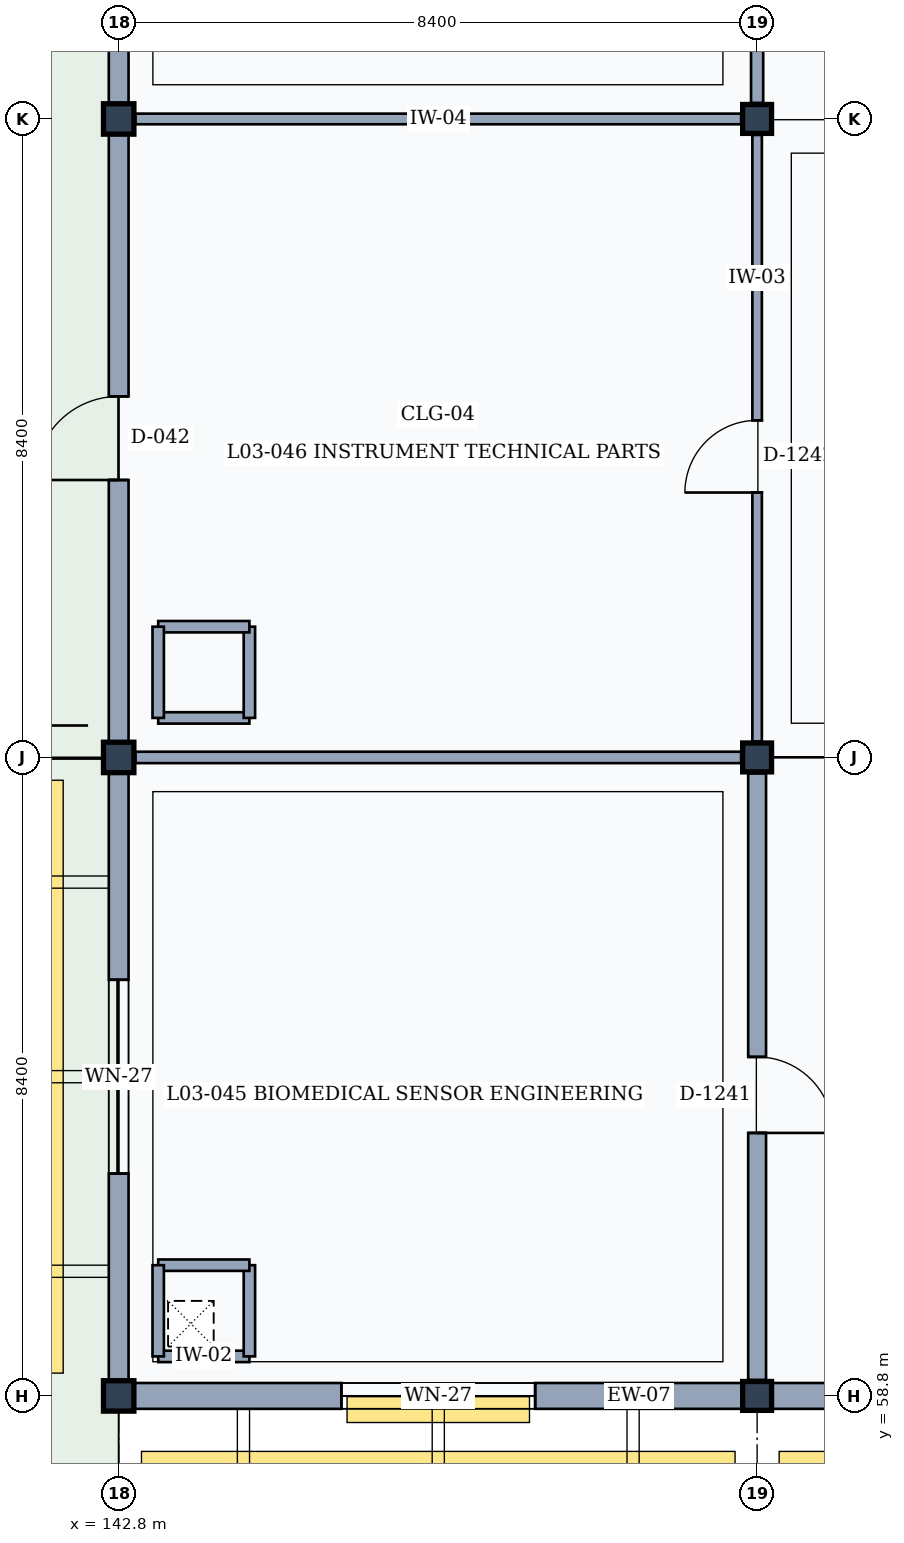
"""IFC4 building model, lengths in metres.
Left out: names, types, materials, properties, quantities, classifications, styles, units other than length and angle.
Written with IfcOpenShell. Run it as: python <this file> out.ifc"""

import sys

from ifc_helpers import new_model, si_unit, direction, frame, frame_2d, origin, origin_2d, place, context, subcontext, project, spatial, rectangle, extrude, element, fill, save


model = new_model("IFC4")
c1 = context("Model", 3, precision=1e-05, world=origin(), true_north=direction((0.0, 1.0)))
c2 = subcontext(c1, "Body", "Model", "MODEL_VIEW")
j1 = project(units=[si_unit("LENGTHUNIT", "METRE"), si_unit("PLANEANGLEUNIT", "RADIAN")], contexts=[c1])
p1 = place(None, origin())
s1 = spatial("IfcSite", under=j1, at=p1, CompositionType="ELEMENT")
p2 = place(p1, origin())
s2 = spatial("IfcBuilding", under=s1, at=p2, CompositionType="ELEMENT")
p3 = place(p2, frame((0.0, 0.0, 13.8)))
s3 = spatial("IfcBuildingStorey", under=s2, at=p3, CompositionType="ELEMENT", Elevation=13.8)
for number, where, z_axis, x_axis in (
    (1, (142.8, 58.8, 0.0), (0.0, 0.0, 1.0), (1.0, 0.0, 0.0)),
    (2, (142.8, 67.2, 0.0), (0.0, 0.0, 1.0), (1.0, 0.0, 0.0)),
    (3, (142.8, 75.6, 0.0), (0.0, 0.0, 1.0), (1.0, 0.0, 0.0)),
):
    element("IfcColumn", number, at=place(p3, frame(where, z_axis=z_axis, x_axis=x_axis)), inside=s3, PredefinedType="COLUMN", context=c2, shape_type="SweptSolid", body=[
        extrude(rectangle(XDim=0.4, YDim=0.4, at=origin_2d()), origin(), (0.0, 0.0, 1.0), 4.2),
    ])
for number, where, z_axis, x_axis in (
    (4, (151.2, 58.8, 0.0), (0.0, 0.0, 1.0), (1.0, 0.0, 0.0)),
    (5, (151.2, 67.2, 0.0), (0.0, 0.0, 1.0), (1.0, 0.0, 0.0)),
    (6, (151.2, 75.6, 0.0), (0.0, 0.0, 1.0), (1.0, 0.0, 0.0)),
):
    element("IfcColumn", number, at=place(p3, frame(where, z_axis=z_axis, x_axis=x_axis)), inside=s3, PredefinedType="COLUMN", context=c2, shape_type="SweptSolid", body=[
        extrude(rectangle(XDim=0.38, YDim=0.38, at=origin_2d()), origin(), (0.0, 0.0, 1.0), 4.2),
    ])
p4 = place(p3, frame((151.01, 58.8, 0.0), z_axis=(0.0, 0.0, 1.0), x_axis=(-1.0, 0.0, 0.0)))
e7 = element("IfcWall", 7, at=p4, inside=s3, PredefinedType="SOLIDWALL", context=c2, shape_type="SweptSolid", body=[
    extrude(rectangle(XDim=8.01, YDim=0.34, at=frame_2d((4.005, 0.0))), origin(), (0.0, 0.0, 1.0), 3.36),
])
p5 = place(p4, frame((2.73, 0.0, 0.9)))
e8 = element("IfcOpeningElement", 8, at=p5, cuts=e7, PredefinedType="OPENING", context=c2, shape_type="SweptSolid", body=[
    extrude(rectangle(XDim=2.55, YDim=1.75, at=frame_2d((1.275, 0.875))), frame((0.0, 0.18, 0.0), z_axis=(0.0, -1.0, 0.0), x_axis=(1.0, 0.0, 0.0)), (0.0, 0.0, 1.0), 0.36),
])
p6 = place(p3, frame((142.8, 59.0, 0.0), z_axis=(0.0, 0.0, 1.0), x_axis=(0.0, 1.0, 0.0)))
e9 = element("IfcWall", 9, at=p6, inside=s3, PredefinedType="SOLIDWALL", context=c2, shape_type="SweptSolid", body=[
    extrude(rectangle(XDim=8.0, YDim=0.26, at=frame_2d((4.0, 0.0))), origin(), (0.0, 0.0, 1.0), 3.36),
])
p7 = place(p6, frame((2.725, 0.0, 0.9)))
e10 = element("IfcOpeningElement", 10, at=p7, cuts=e9, PredefinedType="OPENING", context=c2, shape_type="SweptSolid", body=[
    extrude(rectangle(XDim=2.55, YDim=1.75, at=frame_2d((1.275, 0.875))), frame((0.0, 0.14, 0.0), z_axis=(0.0, -1.0, 0.0), x_axis=(1.0, 0.0, 0.0)), (0.0, 0.0, 1.0), 0.28),
])
p8 = place(p3, frame((142.8, 67.4, 0.0), z_axis=(0.0, 0.0, 1.0), x_axis=(0.0, 1.0, 0.0)))
e11 = element("IfcWall", 11, at=p8, inside=s3, PredefinedType="SOLIDWALL", context=c2, shape_type="SweptSolid", body=[
    extrude(rectangle(XDim=8.0, YDim=0.26, at=frame_2d((4.0, 0.0))), origin(), (0.0, 0.0, 1.0), 3.36),
])
p9 = place(p8, frame((3.45, 0.0, 0.0)))
e12 = element("IfcOpeningElement", 12, at=p9, cuts=e11, PredefinedType="OPENING", context=c2, shape_type="SweptSolid", body=[
    extrude(rectangle(XDim=1.1, YDim=2.2, at=frame_2d((0.55, 1.1))), frame((0.0, 0.14, 0.0), z_axis=(0.0, -1.0, 0.0), x_axis=(1.0, 0.0, 0.0)), (0.0, 0.0, 1.0), 0.28),
])
p10 = place(p3, frame((142.8, 75.8, 0.0), z_axis=(0.0, 0.0, 1.0), x_axis=(0.0, 1.0, 0.0)))
e13 = element("IfcWall", 13, at=p10, inside=s3, PredefinedType="SOLIDWALL", context=c2, shape_type="SweptSolid", body=[
    extrude(rectangle(XDim=8.0, YDim=0.26, at=frame_2d((4.0, 0.0))), origin(), (0.0, 0.0, 1.0), 3.36),
])
p11 = place(p10, frame((3.45, 0.0, 0.0)))
e14 = element("IfcOpeningElement", 14, at=p11, cuts=e13, PredefinedType="OPENING", context=c2, shape_type="SweptSolid", body=[
    extrude(rectangle(XDim=1.1, YDim=2.2, at=frame_2d((0.55, 1.1))), frame((0.0, 0.14, 0.0), z_axis=(0.0, -1.0, 0.0), x_axis=(1.0, 0.0, 0.0)), (0.0, 0.0, 1.0), 0.28),
])
p12 = place(p3, frame((159.4, 58.8, 0.0), z_axis=(0.0, 0.0, 1.0), x_axis=(-1.0, 0.0, 0.0)))
e15 = element("IfcWall", 15, at=p12, inside=s3, PredefinedType="SOLIDWALL", context=c2, shape_type="SweptSolid", body=[
    extrude(rectangle(XDim=8.01, YDim=0.34, at=frame_2d((4.005, 0.0))), origin(), (0.0, 0.0, 1.0), 3.36),
])
p13 = place(p12, frame((3.03, 0.0, 0.9)))
e16 = element("IfcOpeningElement", 16, at=p13, cuts=e15, PredefinedType="OPENING", context=c2, shape_type="SweptSolid", body=[
    extrude(rectangle(XDim=1.95, YDim=1.7, at=frame_2d((0.975, 0.85))), frame((0.0, 0.18, 0.0), z_axis=(0.0, -1.0, 0.0), x_axis=(1.0, 0.0, 0.0)), (0.0, 0.0, 1.0), 0.36),
])
for number, where, z_axis, x_axis in (
    (17, (143.32, 59.32, 0.0), (0.0, 0.0, 1.0), (1.0, 0.0, 0.0)),
    (18, (144.52, 59.32, 0.0), (0.0, 0.0, 1.0), (0.0, 1.0, 0.0)),
    (19, (144.52, 60.52, 0.0), (0.0, 0.0, 1.0), (-1.0, 0.0, 0.0)),
    (20, (143.32, 60.52, 0.0), (0.0, 0.0, 1.0), (0.0, -1.0, 0.0)),
):
    element("IfcWall", number, at=place(p3, frame(where, z_axis=z_axis, x_axis=x_axis)), inside=s3, PredefinedType="PARTITIONING", context=c2, shape_type="SweptSolid", body=[
        extrude(rectangle(XDim=1.2, YDim=0.15, at=frame_2d((0.6, 0.0))), origin(), (0.0, 0.0, 1.0), 3.97),
    ])
for number, where, z_axis, x_axis in (
    (21, (143.32, 67.72, 0.0), (0.0, 0.0, 1.0), (1.0, 0.0, 0.0)),
    (22, (144.52, 67.72, 0.0), (0.0, 0.0, 1.0), (0.0, 1.0, 0.0)),
    (23, (144.52, 68.92, 0.0), (0.0, 0.0, 1.0), (-1.0, 0.0, 0.0)),
    (24, (143.32, 68.92, 0.0), (0.0, 0.0, 1.0), (0.0, -1.0, 0.0)),
):
    element("IfcWall", number, at=place(p3, frame(where, z_axis=z_axis, x_axis=x_axis)), inside=s3, PredefinedType="PARTITIONING", context=c2, shape_type="SweptSolid", body=[
        extrude(rectangle(XDim=1.2, YDim=0.15, at=frame_2d((0.6, 0.0))), origin(), (0.0, 0.0, 1.0), 3.98),
    ])
p14 = place(p3, frame((151.2, 59.01, 0.0), z_axis=(0.0, 0.0, 1.0), x_axis=(0.0, 1.0, 0.0)))
e25 = element("IfcWall", 25, at=p14, inside=s3, PredefinedType="PARTITIONING", context=c2, shape_type="SweptSolid", body=[
    extrude(rectangle(XDim=7.98, YDim=0.235, at=frame_2d((3.99, 0.0))), origin(), (0.0, 0.0, 1.0), 3.32),
])
p15 = place(p14, frame((3.25, 0.0, 0.0)))
e26 = element("IfcOpeningElement", 26, at=p15, cuts=e25, PredefinedType="OPENING", context=c2, shape_type="SweptSolid", body=[
    extrude(rectangle(XDim=1.0, YDim=2.15, at=frame_2d((0.5, 1.075))), frame((0.0, 0.127, 0.0), z_axis=(0.0, -1.0, 0.0), x_axis=(1.0, 0.0, 0.0)), (0.0, 0.0, 1.0), 0.255),
])
p16 = place(p3, frame((143.02, 67.2, 0.0), z_axis=(0.0, 0.0, 1.0), x_axis=(1.0, 0.0, 0.0)))
e27 = element("IfcWall", 27, at=p16, inside=s3, PredefinedType="PARTITIONING", context=c2, shape_type="SweptSolid", body=[
    extrude(rectangle(XDim=7.97, YDim=0.15, at=frame_2d((3.985, 0.0))), origin(), (0.0, 0.0, 1.0), 3.21),
])
p17 = place(p3, frame((151.2, 67.41, 0.0), z_axis=(0.0, 0.0, 1.0), x_axis=(0.0, 1.0, 0.0)))
e28 = element("IfcWall", 28, at=p17, inside=s3, PredefinedType="PARTITIONING", context=c2, shape_type="SweptSolid", body=[
    extrude(rectangle(XDim=7.98, YDim=0.125, at=frame_2d((3.99, 0.0))), origin(), (0.0, 0.0, 1.0), 3.32),
])
p18 = place(p17, frame((3.275, 0.0, 0.0)))
e29 = element("IfcOpeningElement", 29, at=p18, cuts=e28, PredefinedType="OPENING", context=c2, shape_type="SweptSolid", body=[
    extrude(rectangle(XDim=0.95, YDim=2.15, at=frame_2d((0.475, 1.075))), frame((0.0, 0.073, 0.0), z_axis=(0.0, -1.0, 0.0), x_axis=(1.0, 0.0, 0.0)), (0.0, 0.0, 1.0), 0.145),
])
p19 = place(p3, frame((143.02, 75.6, 0.0), z_axis=(0.0, 0.0, 1.0), x_axis=(1.0, 0.0, 0.0)))
e30 = element("IfcWall", 30, at=p19, inside=s3, PredefinedType="PARTITIONING", context=c2, shape_type="SweptSolid", body=[
    extrude(rectangle(XDim=7.97, YDim=0.14, at=frame_2d((3.985, 0.0))), origin(), (0.0, 0.0, 1.0), 3.22),
])
p20 = place(p3, frame((151.2, 75.81, 0.0), z_axis=(0.0, 0.0, 1.0), x_axis=(0.0, 1.0, 0.0)))
e31 = element("IfcWall", 31, at=p20, inside=s3, PredefinedType="PARTITIONING", context=c2, shape_type="SweptSolid", body=[
    extrude(rectangle(XDim=7.98, YDim=0.16, at=frame_2d((3.99, 0.0))), origin(), (0.0, 0.0, 1.0), 3.32),
])
p21 = place(p5, origin())
e32 = element("IfcWindow", 32, at=p21, inside=s3, PartitioningType="SINGLE_PANEL", PredefinedType="WINDOW", context=c2, shape_type="SweptSolid", body=[
    extrude(rectangle(XDim=2.55, YDim=1.75, at=frame_2d((1.275, 0.875))), frame((0.0, 0.03, 0.0), z_axis=(0.0, -1.0, 0.0), x_axis=(1.0, 0.0, 0.0)), (0.0, 0.0, 1.0), 0.06),
])
fill(e8, e32)
p22 = place(p7, origin())
e33 = element("IfcWindow", 33, at=p22, inside=s3, PartitioningType="SINGLE_PANEL", PredefinedType="WINDOW", context=c2, shape_type="SweptSolid", body=[
    extrude(rectangle(XDim=2.55, YDim=1.75, at=frame_2d((1.275, 0.875))), frame((0.0, 0.03, 0.0), z_axis=(0.0, -1.0, 0.0), x_axis=(1.0, 0.0, 0.0)), (0.0, 0.0, 1.0), 0.06),
])
fill(e10, e33)
p23 = place(p9, origin())
e34 = element("IfcDoor", 34, at=p23, inside=s3, OperationType="SINGLE_SWING_LEFT", PredefinedType="DOOR", context=c2, shape_type="SweptSolid", body=[
    extrude(rectangle(XDim=1.1, YDim=2.2, at=frame_2d((0.55, 1.1))), frame((0.0, 0.025, 0.0), z_axis=(0.0, -1.0, 0.0), x_axis=(1.0, 0.0, 0.0)), (0.0, 0.0, 1.0), 0.05),
])
fill(e12, e34)
p24 = place(p15, frame((1.0, 0.0, 0.0), z_axis=(0.0, 0.0, 1.0), x_axis=(-1.0, 0.0, 0.0)))
e35 = element("IfcDoor", 35, at=p24, inside=s3, OperationType="SINGLE_SWING_RIGHT", PredefinedType="DOOR", context=c2, shape_type="SweptSolid", body=[
    extrude(rectangle(XDim=1.0, YDim=2.15, at=frame_2d((0.5, 1.075))), frame((0.0, 0.025, 0.0), z_axis=(0.0, -1.0, 0.0), x_axis=(1.0, 0.0, 0.0)), (0.0, 0.0, 1.0), 0.05),
])
fill(e26, e35)
p25 = place(p18, origin())
e36 = element("IfcDoor", 36, at=p25, inside=s3, OperationType="SINGLE_SWING_LEFT", PredefinedType="DOOR", context=c2, shape_type="SweptSolid", body=[
    extrude(rectangle(XDim=0.95, YDim=2.15, at=frame_2d((0.475, 1.075))), frame((0.0, 0.025, 0.0), z_axis=(0.0, -1.0, 0.0), x_axis=(1.0, 0.0, 0.0)), (0.0, 0.0, 1.0), 0.05),
])
fill(e29, e36)
save(model, sys.argv[1])
